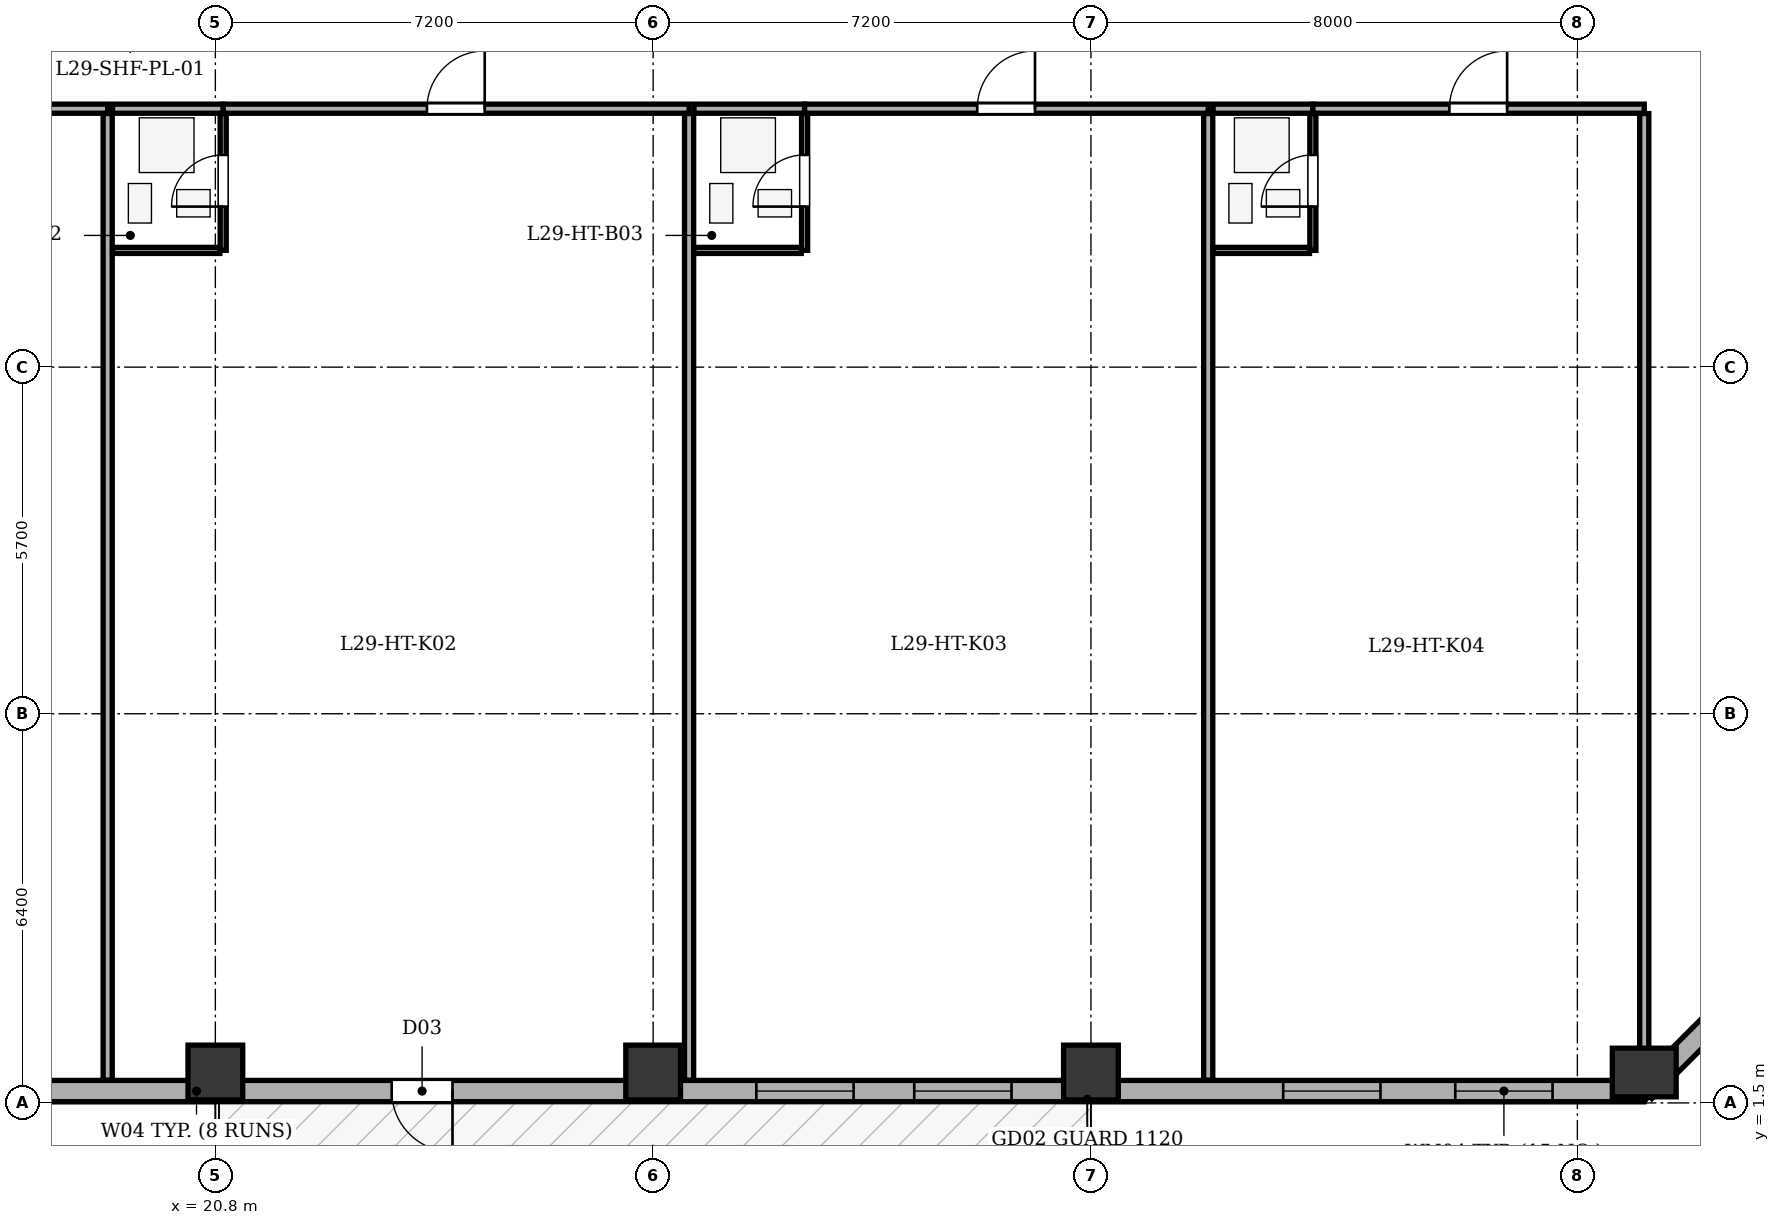
"""IFC4 building model, lengths in metres.
Left out: names, types, materials, properties, quantities, classifications, styles, units other than length and angle.
Written with IfcOpenShell. Run it as: python <this file> out.ifc"""

import sys

from ifc_helpers import new_model, si_unit, direction, frame, frame_2d, origin, origin_2d, place, context, subcontext, project, spatial, rectangle, extrude, element, fill, save


model = new_model("IFC4")
c1 = context("Model", 3, precision=1e-05, world=origin(), true_north=direction((0.0, 1.0)))
c2 = subcontext(c1, "Body", "Model", "MODEL_VIEW")
j1 = project(units=[si_unit("LENGTHUNIT", "METRE"), si_unit("PLANEANGLEUNIT", "RADIAN")], contexts=[c1])
p1 = place(None, origin())
s1 = spatial("IfcSite", under=j1, at=p1, CompositionType="ELEMENT")
p2 = place(p1, origin())
s2 = spatial("IfcBuilding", under=s1, at=p2, CompositionType="ELEMENT")
p3 = place(p2, frame((0.0, 0.0, 120.3)))
s3 = spatial("IfcBuildingStorey", under=s2, at=p3, CompositionType="ELEMENT", Elevation=120.3)
for number, where, z_axis, x_axis in (
    (1, (20.8, 2.0, 0.0), (0.0, 0.0, 1.0), (1.0, 0.0, 0.0)),
    (2, (28.0, 2.0, 0.0), (0.0, 0.0, 1.0), (1.0, 0.0, 0.0)),
    (3, (35.2, 2.0, 0.0), (0.0, 0.0, 1.0), (1.0, 0.0, 0.0)),
):
    element("IfcColumn", number, at=place(p3, frame(where, z_axis=z_axis, x_axis=x_axis)), inside=s3, PredefinedType="COLUMN", context=c2, shape_type="SweptSolid", body=[
        extrude(rectangle(XDim=0.9, YDim=0.9, at=origin_2d()), origin(), (0.0, 0.0, 1.0), 3.5),
    ])
p4 = place(p3, frame((44.3, 2.0, 0.0), z_axis=(0.0, 0.0, 1.0), x_axis=(1.0, 0.0, 0.0)))
e4 = element("IfcColumn", 4, at=p4, inside=s3, PredefinedType="COLUMN", context=c2, shape_type="SweptSolid", body=[
    extrude(rectangle(XDim=0.8, YDim=1.05, at=origin_2d()), origin(), (0.0, 0.0, 1.0), 3.5),
])
p5 = place(p3, frame((44.3, 1.695, 0.0), z_axis=(0.0, 0.0, 1.0), x_axis=(-1.0, 0.0, 0.0)))
e5 = element("IfcWall", 5, at=p5, inside=s3, PredefinedType="STANDARD", context=c2, shape_type="SweptSolid", body=[
    extrude(rectangle(XDim=35.0, YDim=0.35, at=frame_2d((17.5, 0.0))), origin(), (0.0, 0.0, 1.0), 2.785),
])
p6 = place(p5, frame((19.6, 0.0, 0.0)))
e6 = element("IfcOpeningElement", 6, at=p6, cuts=e5, PredefinedType="OPENING", context=c2, shape_type="SweptSolid", body=[
    extrude(rectangle(XDim=1.0, YDim=2.02, at=frame_2d((0.5, 1.01))), frame((0.0, 0.185, 0.0), z_axis=(0.0, -1.0, 0.0), x_axis=(1.0, 0.0, 0.0)), (0.0, 0.0, 1.0), 0.37),
])
p7 = place(p5, frame((1.508, 0.0, 0.75)))
e7 = element("IfcOpeningElement", 7, at=p7, cuts=e5, PredefinedType="OPENING", context=c2, shape_type="SweptSolid", body=[
    extrude(rectangle(XDim=1.6, YDim=1.75, at=frame_2d((0.8, 0.875))), frame((0.0, 0.185, 0.0), z_axis=(0.0, -1.0, 0.0), x_axis=(1.0, 0.0, 0.0)), (0.0, 0.0, 1.0), 0.37),
])
p8 = place(p5, frame((4.338, 0.0, 0.75)))
e8 = element("IfcOpeningElement", 8, at=p8, cuts=e5, PredefinedType="OPENING", context=c2, shape_type="SweptSolid", body=[
    extrude(rectangle(XDim=1.6, YDim=1.75, at=frame_2d((0.8, 0.875))), frame((0.0, 0.185, 0.0), z_axis=(0.0, -1.0, 0.0), x_axis=(1.0, 0.0, 0.0)), (0.0, 0.0, 1.0), 0.37),
])
p9 = place(p5, frame((10.406, 0.0, 0.75)))
e9 = element("IfcOpeningElement", 9, at=p9, cuts=e5, PredefinedType="OPENING", context=c2, shape_type="SweptSolid", body=[
    extrude(rectangle(XDim=1.6, YDim=1.75, at=frame_2d((0.8, 0.875))), frame((0.0, 0.185, 0.0), z_axis=(0.0, -1.0, 0.0), x_axis=(1.0, 0.0, 0.0)), (0.0, 0.0, 1.0), 0.37),
])
p10 = place(p5, frame((13.003, 0.0, 0.75)))
e10 = element("IfcOpeningElement", 10, at=p10, cuts=e5, PredefinedType="OPENING", context=c2, shape_type="SweptSolid", body=[
    extrude(rectangle(XDim=1.6, YDim=1.75, at=frame_2d((0.8, 0.875))), frame((0.0, 0.185, 0.0), z_axis=(0.0, -1.0, 0.0), x_axis=(1.0, 0.0, 0.0)), (0.0, 0.0, 1.0), 0.37),
])
p11 = place(p5, frame((27.02, 0.0, 0.75)))
e11 = element("IfcOpeningElement", 11, at=p11, cuts=e5, PredefinedType="OPENING", context=c2, shape_type="SweptSolid", body=[
    extrude(rectangle(XDim=1.6, YDim=1.75, at=frame_2d((0.8, 0.875))), frame((0.0, 0.185, 0.0), z_axis=(0.0, -1.0, 0.0), x_axis=(1.0, 0.0, 0.0)), (0.0, 0.0, 1.0), 0.37),
])
p12 = place(p5, frame((30.551, 0.0, 0.75)))
e12 = element("IfcOpeningElement", 12, at=p12, cuts=e5, PredefinedType="OPENING", context=c2, shape_type="SweptSolid", body=[
    extrude(rectangle(XDim=2.1, YDim=1.75, at=frame_2d((1.05, 0.875))), frame((0.0, 0.185, 0.0), z_axis=(0.0, -1.0, 0.0), x_axis=(1.0, 0.0, 0.0)), (0.0, 0.0, 1.0), 0.37),
])
p13 = place(p3, frame((49.105, 6.5, 0.0), z_axis=(0.0, 0.0, 1.0), x_axis=(-0.707106781187, -0.707106781187, 0.0)))
e13 = element("IfcWall", 13, at=p13, inside=s3, PredefinedType="STANDARD", context=c2, shape_type="SweptSolid", body=[
    extrude(rectangle(XDim=6.795, YDim=0.35, at=frame_2d((3.397, 0.0))), origin(), (0.0, 0.0, 1.0), 2.785),
])
p14 = place(p13, frame((2.698, 0.0, 0.75)))
e14 = element("IfcOpeningElement", 14, at=p14, cuts=e13, PredefinedType="OPENING", context=c2, shape_type="SweptSolid", body=[
    extrude(rectangle(XDim=1.4, YDim=1.65, at=frame_2d((0.7, 0.825))), frame((0.0, 0.185, 0.0), z_axis=(0.0, -1.0, 0.0), x_axis=(1.0, 0.0, 0.0)), (0.0, 0.0, 1.0), 0.37),
])
p15 = place(p3, frame((12.05, 17.85, 0.0), z_axis=(0.0, 0.0, 1.0), x_axis=(1.0, 0.0, 0.0)))
e15 = element("IfcWall", 15, at=p15, inside=s3, PredefinedType="PARTITIONING", context=c2, shape_type="SweptSolid", body=[
    extrude(rectangle(XDim=6.979, YDim=0.15, at=frame_2d((3.49, 0.0))), origin(), (0.0, 0.0, 1.0), 3.2),
])
p16 = place(p15, frame((3.01, 0.0, 0.0)))
e16 = element("IfcOpeningElement", 16, at=p16, cuts=e15, PredefinedType="OPENING", context=c2, shape_type="SweptSolid", body=[
    extrude(rectangle(XDim=0.95, YDim=2.1, at=frame_2d((0.475, 1.05))), frame((0.0, 0.085, 0.0), z_axis=(0.0, -1.0, 0.0), x_axis=(1.0, 0.0, 0.0)), (0.0, 0.0, 1.0), 0.17),
])
p17 = place(p3, frame((19.029, 1.875, 0.0), z_axis=(0.0, 0.0, 1.0), x_axis=(0.0, 1.0, 0.0)))
e17 = element("IfcWall", 17, at=p17, inside=s3, PredefinedType="PARTITIONING", context=c2, shape_type="SweptSolid", body=[
    extrude(rectangle(XDim=15.895, YDim=0.15, at=frame_2d((7.948, 0.0))), origin(), (0.0, 0.0, 1.0), 3.2),
])
p18 = place(p3, frame((19.109, 17.85, 0.0), z_axis=(0.0, 0.0, 1.0), x_axis=(1.0, 0.0, 0.0)))
e18 = element("IfcWall", 18, at=p18, inside=s3, PredefinedType="PARTITIONING", context=c2, shape_type="SweptSolid", body=[
    extrude(rectangle(XDim=1.82, YDim=0.15, at=frame_2d((0.91, 0.0))), origin(), (0.0, 0.0, 1.0), 3.2),
])
p19 = place(p3, frame((20.929, 17.85, 0.0), z_axis=(0.0, 0.0, 1.0), x_axis=(1.0, 0.0, 0.0)))
e19 = element("IfcWall", 19, at=p19, inside=s3, PredefinedType="PARTITIONING", context=c2, shape_type="SweptSolid", body=[
    extrude(rectangle(XDim=7.662, YDim=0.15, at=frame_2d((3.831, 0.0))), origin(), (0.0, 0.0, 1.0), 3.2),
])
p20 = place(p19, frame((3.351, 0.0, 0.0)))
e20 = element("IfcOpeningElement", 20, at=p20, cuts=e19, PredefinedType="OPENING", context=c2, shape_type="SweptSolid", body=[
    extrude(rectangle(XDim=0.95, YDim=2.1, at=frame_2d((0.475, 1.05))), frame((0.0, 0.085, 0.0), z_axis=(0.0, -1.0, 0.0), x_axis=(1.0, 0.0, 0.0)), (0.0, 0.0, 1.0), 0.17),
])
p21 = place(p3, frame((20.929, 15.52, 0.0), z_axis=(0.0, 0.0, 1.0), x_axis=(0.0, 1.0, 0.0)))
e21 = element("IfcWall", 21, at=p21, inside=s3, PredefinedType="PARTITIONING", context=c2, shape_type="SweptSolid", body=[
    extrude(rectangle(XDim=2.25, YDim=0.1, at=frame_2d((1.125, 0.0))), origin(), (0.0, 0.0, 1.0), 2.535),
])
p22 = place(p21, frame((0.72, 0.0, 0.0)))
e22 = element("IfcOpeningElement", 22, at=p22, cuts=e21, PredefinedType="OPENING", context=c2, shape_type="SweptSolid", body=[
    extrude(rectangle(XDim=0.85, YDim=2.05, at=frame_2d((0.425, 1.025))), frame((0.0, 0.06, 0.0), z_axis=(0.0, -1.0, 0.0), x_axis=(1.0, 0.0, 0.0)), (0.0, 0.0, 1.0), 0.12),
])
p23 = place(p3, frame((19.109, 15.52, 0.0), z_axis=(0.0, 0.0, 1.0), x_axis=(1.0, 0.0, 0.0)))
e23 = element("IfcWall", 23, at=p23, inside=s3, PredefinedType="PARTITIONING", context=c2, shape_type="SweptSolid", body=[
    extrude(rectangle(XDim=1.765, YDim=0.1, at=frame_2d((0.883, 0.0))), origin(), (0.0, 0.0, 1.0), 3.2),
])
p24 = place(p3, frame((28.591, 1.875, 0.0), z_axis=(0.0, 0.0, 1.0), x_axis=(0.0, 1.0, 0.0)))
e24 = element("IfcWall", 24, at=p24, inside=s3, PredefinedType="PARTITIONING", context=c2, shape_type="SweptSolid", body=[
    extrude(rectangle(XDim=15.895, YDim=0.15, at=frame_2d((7.948, 0.0))), origin(), (0.0, 0.0, 1.0), 3.2),
])
p25 = place(p3, frame((28.671, 17.85, 0.0), z_axis=(0.0, 0.0, 1.0), x_axis=(1.0, 0.0, 0.0)))
e25 = element("IfcWall", 25, at=p25, inside=s3, PredefinedType="PARTITIONING", context=c2, shape_type="SweptSolid", body=[
    extrude(rectangle(XDim=1.82, YDim=0.15, at=frame_2d((0.91, 0.0))), origin(), (0.0, 0.0, 1.0), 3.2),
])
p26 = place(p3, frame((30.491, 17.85, 0.0), z_axis=(0.0, 0.0, 1.0), x_axis=(1.0, 0.0, 0.0)))
e26 = element("IfcWall", 26, at=p26, inside=s3, PredefinedType="PARTITIONING", context=c2, shape_type="SweptSolid", body=[
    extrude(rectangle(XDim=6.638, YDim=0.15, at=frame_2d((3.319, 0.0))), origin(), (0.0, 0.0, 1.0), 3.2),
])
p27 = place(p26, frame((2.839, 0.0, 0.0)))
e27 = element("IfcOpeningElement", 27, at=p27, cuts=e26, PredefinedType="OPENING", context=c2, shape_type="SweptSolid", body=[
    extrude(rectangle(XDim=0.95, YDim=2.1, at=frame_2d((0.475, 1.05))), frame((0.0, 0.085, 0.0), z_axis=(0.0, -1.0, 0.0), x_axis=(1.0, 0.0, 0.0)), (0.0, 0.0, 1.0), 0.17),
])
p28 = place(p3, frame((30.491, 15.52, 0.0), z_axis=(0.0, 0.0, 1.0), x_axis=(0.0, 1.0, 0.0)))
e28 = element("IfcWall", 28, at=p28, inside=s3, PredefinedType="PARTITIONING", context=c2, shape_type="SweptSolid", body=[
    extrude(rectangle(XDim=2.25, YDim=0.1, at=frame_2d((1.125, 0.0))), origin(), (0.0, 0.0, 1.0), 3.2),
])
p29 = place(p28, frame((0.72, 0.0, 0.0)))
e29 = element("IfcOpeningElement", 29, at=p29, cuts=e28, PredefinedType="OPENING", context=c2, shape_type="SweptSolid", body=[
    extrude(rectangle(XDim=0.85, YDim=2.05, at=frame_2d((0.425, 1.025))), frame((0.0, 0.06, 0.0), z_axis=(0.0, -1.0, 0.0), x_axis=(1.0, 0.0, 0.0)), (0.0, 0.0, 1.0), 0.12),
])
p30 = place(p3, frame((28.671, 15.52, 0.0), z_axis=(0.0, 0.0, 1.0), x_axis=(1.0, 0.0, 0.0)))
e30 = element("IfcWall", 30, at=p30, inside=s3, PredefinedType="PARTITIONING", context=c2, shape_type="SweptSolid", body=[
    extrude(rectangle(XDim=1.765, YDim=0.1, at=frame_2d((0.883, 0.0))), origin(), (0.0, 0.0, 1.0), 3.2),
])
p31 = place(p3, frame((37.129, 1.875, 0.0), z_axis=(0.0, 0.0, 1.0), x_axis=(0.0, 1.0, 0.0)))
e31 = element("IfcWall", 31, at=p31, inside=s3, PredefinedType="PARTITIONING", context=c2, shape_type="SweptSolid", body=[
    extrude(rectangle(XDim=15.895, YDim=0.15, at=frame_2d((7.948, 0.0))), origin(), (0.0, 0.0, 1.0), 3.2),
])
p32 = place(p3, frame((37.209, 17.85, 0.0), z_axis=(0.0, 0.0, 1.0), x_axis=(1.0, 0.0, 0.0)))
e32 = element("IfcWall", 32, at=p32, inside=s3, PredefinedType="PARTITIONING", context=c2, shape_type="SweptSolid", body=[
    extrude(rectangle(XDim=1.641, YDim=0.15, at=frame_2d((0.821, 0.0))), origin(), (0.0, 0.0, 1.0), 3.2),
])
p33 = place(p3, frame((38.85, 17.85, 0.0), z_axis=(0.0, 0.0, 1.0), x_axis=(1.0, 0.0, 0.0)))
e33 = element("IfcWall", 33, at=p33, inside=s3, PredefinedType="PARTITIONING", context=c2, shape_type="SweptSolid", body=[
    extrude(rectangle(XDim=5.45, YDim=0.15, at=frame_2d((2.725, 0.0))), origin(), (0.0, 0.0, 1.0), 3.2),
])
p34 = place(p33, frame((2.245, 0.0, 0.0)))
e34 = element("IfcOpeningElement", 34, at=p34, cuts=e33, PredefinedType="OPENING", context=c2, shape_type="SweptSolid", body=[
    extrude(rectangle(XDim=0.95, YDim=2.1, at=frame_2d((0.475, 1.05))), frame((0.0, 0.085, 0.0), z_axis=(0.0, -1.0, 0.0), x_axis=(1.0, 0.0, 0.0)), (0.0, 0.0, 1.0), 0.17),
])
p35 = place(p3, frame((38.85, 15.52, 0.0), z_axis=(0.0, 0.0, 1.0), x_axis=(0.0, 1.0, 0.0)))
e35 = element("IfcWall", 35, at=p35, inside=s3, PredefinedType="PARTITIONING", context=c2, shape_type="SweptSolid", body=[
    extrude(rectangle(XDim=2.25, YDim=0.1, at=frame_2d((1.125, 0.0))), origin(), (0.0, 0.0, 1.0), 3.2),
])
p36 = place(p35, frame((0.72, 0.0, 0.0)))
e36 = element("IfcOpeningElement", 36, at=p36, cuts=e35, PredefinedType="OPENING", context=c2, shape_type="SweptSolid", body=[
    extrude(rectangle(XDim=0.85, YDim=2.05, at=frame_2d((0.425, 1.025))), frame((0.0, 0.06, 0.0), z_axis=(0.0, -1.0, 0.0), x_axis=(1.0, 0.0, 0.0)), (0.0, 0.0, 1.0), 0.12),
])
p37 = place(p3, frame((37.209, 15.52, 0.0), z_axis=(0.0, 0.0, 1.0), x_axis=(1.0, 0.0, 0.0)))
e37 = element("IfcWall", 37, at=p37, inside=s3, PredefinedType="PARTITIONING", context=c2, shape_type="SweptSolid", body=[
    extrude(rectangle(XDim=1.586, YDim=0.1, at=frame_2d((0.793, 0.0))), origin(), (0.0, 0.0, 1.0), 3.2),
])
p38 = place(p3, frame((44.3, 1.875, 0.0), z_axis=(0.0, 0.0, 1.0), x_axis=(0.0, 1.0, 0.0)))
e38 = element("IfcWall", 38, at=p38, inside=s3, PredefinedType="PARTITIONING", context=c2, shape_type="SweptSolid", body=[
    extrude(rectangle(XDim=15.895, YDim=0.15, at=frame_2d((7.948, 0.0))), origin(), (0.0, 0.0, 1.0), 3.2),
])
p39 = place(p6, origin())
e39 = element("IfcDoor", 39, at=p39, inside=s3, OperationType="SINGLE_SWING_LEFT", PredefinedType="DOOR", context=c2, shape_type="SweptSolid", body=[
    extrude(rectangle(XDim=1.0, YDim=2.02, at=frame_2d((0.5, 1.01))), frame((0.0, 0.025, 0.0), z_axis=(0.0, -1.0, 0.0), x_axis=(1.0, 0.0, 0.0)), (0.0, 0.0, 1.0), 0.05),
])
fill(e6, e39)
p40 = place(p7, origin())
e40 = element("IfcWindow", 40, at=p40, inside=s3, PartitioningType="SINGLE_PANEL", PredefinedType="WINDOW", context=c2, shape_type="SweptSolid", body=[
    extrude(rectangle(XDim=1.6, YDim=1.75, at=frame_2d((0.8, 0.875))), frame((0.0, -0.01, 0.0), z_axis=(0.0, -1.0, 0.0), x_axis=(1.0, 0.0, 0.0)), (0.0, 0.0, 1.0), 0.06),
])
fill(e7, e40)
p41 = place(p8, origin())
e41 = element("IfcWindow", 41, at=p41, inside=s3, PartitioningType="SINGLE_PANEL", PredefinedType="WINDOW", context=c2, shape_type="SweptSolid", body=[
    extrude(rectangle(XDim=1.6, YDim=1.75, at=frame_2d((0.8, 0.875))), frame((0.0, -0.01, 0.0), z_axis=(0.0, -1.0, 0.0), x_axis=(1.0, 0.0, 0.0)), (0.0, 0.0, 1.0), 0.06),
])
fill(e8, e41)
p42 = place(p9, origin())
e42 = element("IfcWindow", 42, at=p42, inside=s3, PartitioningType="SINGLE_PANEL", PredefinedType="WINDOW", context=c2, shape_type="SweptSolid", body=[
    extrude(rectangle(XDim=1.6, YDim=1.75, at=frame_2d((0.8, 0.875))), frame((0.0, -0.01, 0.0), z_axis=(0.0, -1.0, 0.0), x_axis=(1.0, 0.0, 0.0)), (0.0, 0.0, 1.0), 0.06),
])
fill(e9, e42)
p43 = place(p10, origin())
e43 = element("IfcWindow", 43, at=p43, inside=s3, PartitioningType="SINGLE_PANEL", PredefinedType="WINDOW", context=c2, shape_type="SweptSolid", body=[
    extrude(rectangle(XDim=1.6, YDim=1.75, at=frame_2d((0.8, 0.875))), frame((0.0, -0.01, 0.0), z_axis=(0.0, -1.0, 0.0), x_axis=(1.0, 0.0, 0.0)), (0.0, 0.0, 1.0), 0.06),
])
fill(e10, e43)
p44 = place(p22, origin())
e44 = element("IfcDoor", 44, at=p44, inside=s3, OperationType="SINGLE_SWING_LEFT", PredefinedType="DOOR", context=c2, shape_type="SweptSolid", body=[
    extrude(rectangle(XDim=0.85, YDim=2.05, at=frame_2d((0.425, 1.025))), frame((0.0, 0.025, 0.0), z_axis=(0.0, -1.0, 0.0), x_axis=(1.0, 0.0, 0.0)), (0.0, 0.0, 1.0), 0.05),
])
fill(e22, e44)
p45 = place(p20, origin())
e45 = element("IfcDoor", 45, at=p45, inside=s3, OperationType="SINGLE_SWING_RIGHT", PredefinedType="DOOR", context=c2, shape_type="SweptSolid", body=[
    extrude(rectangle(XDim=0.95, YDim=2.1, at=frame_2d((0.475, 1.05))), frame((0.0, 0.025, 0.0), z_axis=(0.0, -1.0, 0.0), x_axis=(1.0, 0.0, 0.0)), (0.0, 0.0, 1.0), 0.05),
])
fill(e20, e45)
p46 = place(p29, origin())
e46 = element("IfcDoor", 46, at=p46, inside=s3, OperationType="SINGLE_SWING_LEFT", PredefinedType="DOOR", context=c2, shape_type="SweptSolid", body=[
    extrude(rectangle(XDim=0.85, YDim=2.05, at=frame_2d((0.425, 1.025))), frame((0.0, 0.025, 0.0), z_axis=(0.0, -1.0, 0.0), x_axis=(1.0, 0.0, 0.0)), (0.0, 0.0, 1.0), 0.05),
])
fill(e29, e46)
p47 = place(p27, origin())
e47 = element("IfcDoor", 47, at=p47, inside=s3, OperationType="SINGLE_SWING_RIGHT", PredefinedType="DOOR", context=c2, shape_type="SweptSolid", body=[
    extrude(rectangle(XDim=0.95, YDim=2.1, at=frame_2d((0.475, 1.05))), frame((0.0, 0.025, 0.0), z_axis=(0.0, -1.0, 0.0), x_axis=(1.0, 0.0, 0.0)), (0.0, 0.0, 1.0), 0.05),
])
fill(e27, e47)
p48 = place(p36, origin())
e48 = element("IfcDoor", 48, at=p48, inside=s3, OperationType="SINGLE_SWING_LEFT", PredefinedType="DOOR", context=c2, shape_type="SweptSolid", body=[
    extrude(rectangle(XDim=0.85, YDim=2.05, at=frame_2d((0.425, 1.025))), frame((0.0, 0.025, 0.0), z_axis=(0.0, -1.0, 0.0), x_axis=(1.0, 0.0, 0.0)), (0.0, 0.0, 1.0), 0.05),
])
fill(e36, e48)
p49 = place(p34, origin())
e49 = element("IfcDoor", 49, at=p49, inside=s3, OperationType="SINGLE_SWING_RIGHT", PredefinedType="DOOR", context=c2, shape_type="SweptSolid", body=[
    extrude(rectangle(XDim=0.95, YDim=2.1, at=frame_2d((0.475, 1.05))), frame((0.0, 0.025, 0.0), z_axis=(0.0, -1.0, 0.0), x_axis=(1.0, 0.0, 0.0)), (0.0, 0.0, 1.0), 0.05),
])
fill(e34, e49)
save(model, sys.argv[1])
